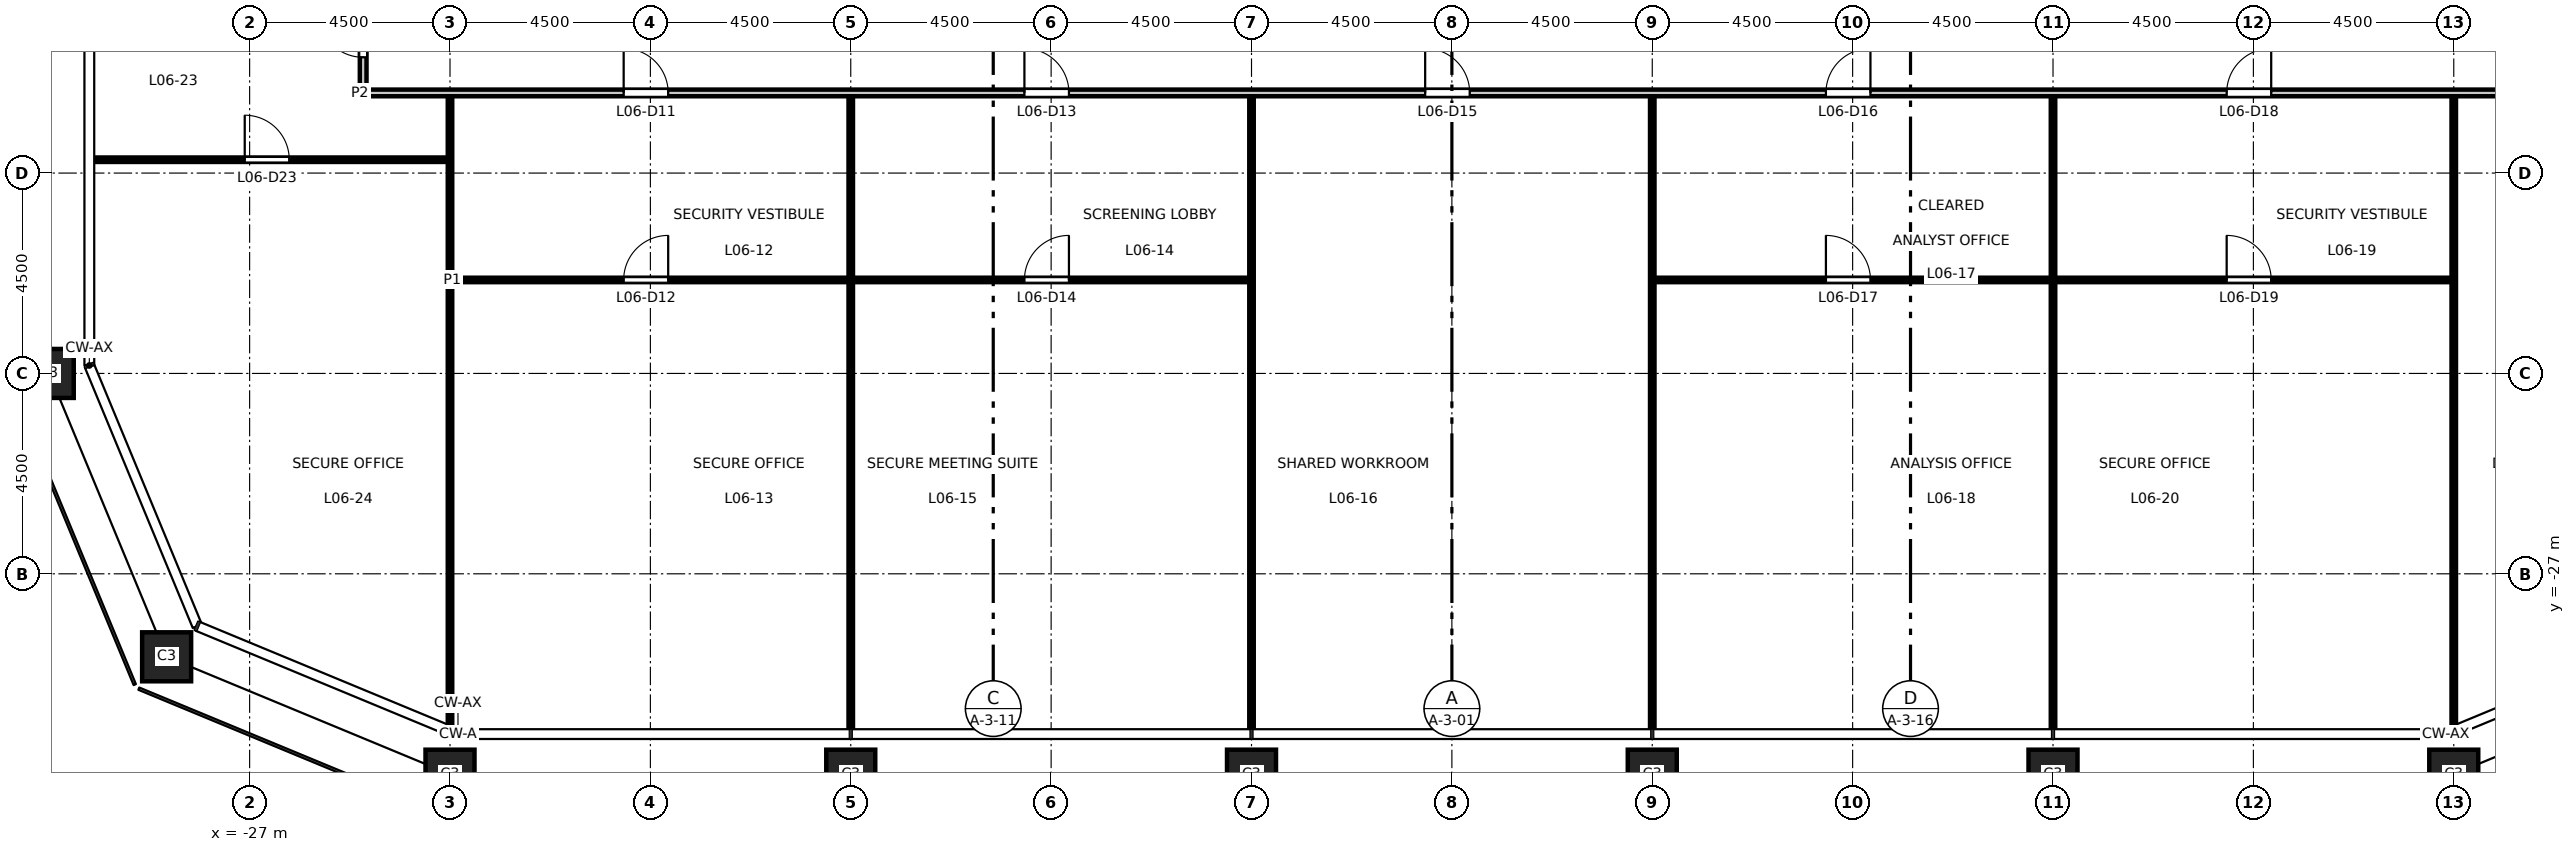
"""IFC4 building model, lengths in metres.
Left out: names, types, materials, properties, quantities, classifications, styles, units other than length and angle.
Written with IfcOpenShell. Run it as: python <this file> out.ifc"""

import sys

from ifc_helpers import new_model, si_unit, direction, frame, frame_2d, origin, origin_2d, place, context, subcontext, project, spatial, rectangle, hollow_rectangle, extrude, element, fill, save


model = new_model("IFC4")
c1 = context("Model", 3, precision=1e-05, world=origin(), true_north=direction((0.0, 1.0)))
c2 = subcontext(c1, "Body", "Model", "MODEL_VIEW")
j1 = project(units=[si_unit("LENGTHUNIT", "METRE"), si_unit("PLANEANGLEUNIT", "RADIAN")], contexts=[c1])
p1 = place(None, origin())
s1 = spatial("IfcSite", under=j1, at=p1, CompositionType="ELEMENT")
p2 = place(p1, origin())
s2 = spatial("IfcBuilding", under=s1, at=p2, CompositionType="ELEMENT")
p3 = place(p2, frame((0.0, 0.0, 31.2)))
s3 = spatial("IfcBuildingStorey", under=s2, at=p3, CompositionType="ELEMENT", Elevation=31.2)
for number, where, z_axis, x_axis in (
    (1, (-22.5, -31.5, 0.0), (0.0, 0.0, 1.0), (1.0, 0.0, 0.0)),
    (2, (-13.5, -31.5, 0.0), (0.0, 0.0, 1.0), (1.0, 0.0, 0.0)),
    (3, (-4.5, -31.5, 0.0), (0.0, 0.0, 1.0), (1.0, 0.0, 0.0)),
    (4, (4.5, -31.5, 0.0), (0.0, 0.0, 1.0), (1.0, 0.0, 0.0)),
    (5, (13.5, -31.5, 0.0), (0.0, 0.0, 1.0), (1.0, 0.0, 0.0)),
    (6, (22.5, -31.5, 0.0), (0.0, 0.0, 1.0), (1.0, 0.0, 0.0)),
    (7, (-31.5, -22.5, 0.0), (0.0, 0.0, 1.0), (1.0, 0.0, 0.0)),
    (8, (-28.864, -28.864, 0.0), (0.0, 0.0, 1.0), (1.0, 0.0, 0.0)),
):
    element("IfcColumn", number, at=place(p3, frame(where, z_axis=z_axis, x_axis=x_axis)), inside=s3, PredefinedType="COLUMN", context=c2, shape_type="SweptSolid", body=[
        extrude(hollow_rectangle(XDim=1.1, YDim=1.1, WallThickness=0.07, at=origin_2d()), origin(), (0.0, 0.0, 1.0), 4.5),
    ])
p4 = place(p3, frame((-22.45, -20.4, 0.0), z_axis=(0.0, 0.0, 1.0), x_axis=(1.0, 0.0, 0.0)))
e9 = element("IfcWall", 9, at=p4, inside=s3, PredefinedType="PARTITIONING", context=c2, shape_type="SweptSolid", body=[
    extrude(rectangle(XDim=17.9, YDim=0.1, at=frame_2d((8.95, 0.0))), origin(), (0.0, 0.0, 1.0), 4.35),
])
p5 = place(p4, frame((3.85, 0.0, 0.0)))
e10 = element("IfcOpeningElement", 10, at=p5, cuts=e9, PredefinedType="OPENING", context=c2, shape_type="SweptSolid", body=[
    extrude(rectangle(XDim=1.0, YDim=2.1, at=frame_2d((0.5, 1.05))), frame((0.0, 0.06, 0.0), z_axis=(0.0, -1.0, 0.0), x_axis=(1.0, 0.0, 0.0)), (0.0, 0.0, 1.0), 0.12),
])
p6 = place(p4, frame((12.85, 0.0, 0.0)))
e11 = element("IfcOpeningElement", 11, at=p6, cuts=e9, PredefinedType="OPENING", context=c2, shape_type="SweptSolid", body=[
    extrude(rectangle(XDim=1.0, YDim=2.1, at=frame_2d((0.5, 1.05))), frame((0.0, 0.06, 0.0), z_axis=(0.0, -1.0, 0.0), x_axis=(1.0, 0.0, 0.0)), (0.0, 0.0, 1.0), 0.12),
])
p7 = place(p3, frame((4.55, -20.4, 0.0), z_axis=(0.0, 0.0, 1.0), x_axis=(1.0, 0.0, 0.0)))
e12 = element("IfcWall", 12, at=p7, inside=s3, PredefinedType="PARTITIONING", context=c2, shape_type="SweptSolid", body=[
    extrude(rectangle(XDim=17.9, YDim=0.1, at=frame_2d((8.95, 0.0))), origin(), (0.0, 0.0, 1.0), 4.35),
])
p8 = place(p7, frame((3.85, 0.0, 0.0)))
e13 = element("IfcOpeningElement", 13, at=p8, cuts=e12, PredefinedType="OPENING", context=c2, shape_type="SweptSolid", body=[
    extrude(rectangle(XDim=1.0, YDim=2.1, at=frame_2d((0.5, 1.05))), frame((0.0, 0.06, 0.0), z_axis=(0.0, -1.0, 0.0), x_axis=(1.0, 0.0, 0.0)), (0.0, 0.0, 1.0), 0.12),
])
p9 = place(p7, frame((12.85, 0.0, 0.0)))
e14 = element("IfcOpeningElement", 14, at=p9, cuts=e12, PredefinedType="OPENING", context=c2, shape_type="SweptSolid", body=[
    extrude(rectangle(XDim=1.0, YDim=2.1, at=frame_2d((0.5, 1.05))), frame((0.0, 0.06, 0.0), z_axis=(0.0, -1.0, 0.0), x_axis=(1.0, 0.0, 0.0)), (0.0, 0.0, 1.0), 0.12),
])
p10 = place(p3, frame((-30.51, -17.7, 0.0), z_axis=(0.0, 0.0, 1.0), x_axis=(1.0, 0.0, 0.0)))
e15 = element("IfcWall", 15, at=p10, inside=s3, PredefinedType="PARTITIONING", context=c2, shape_type="SweptSolid", body=[
    extrude(rectangle(XDim=7.96, YDim=0.1, at=frame_2d((3.98, 0.0))), origin(), (0.0, 0.0, 1.0), 4.35),
])
p11 = place(p10, frame((3.4, 0.0, 0.0)))
e16 = element("IfcOpeningElement", 16, at=p11, cuts=e15, PredefinedType="OPENING", context=c2, shape_type="SweptSolid", body=[
    extrude(rectangle(XDim=1.0, YDim=2.1, at=frame_2d((0.5, 1.05))), frame((0.0, 0.06, 0.0), z_axis=(0.0, -1.0, 0.0), x_axis=(1.0, 0.0, 0.0)), (0.0, 0.0, 1.0), 0.12),
])
p12 = place(p3, frame((-24.525, -16.2, 0.0), z_axis=(0.0, 0.0, 1.0), x_axis=(1.0, 0.0, 0.0)))
e17 = element("IfcWall", 17, at=p12, inside=s3, PredefinedType="PARTITIONING", context=c2, shape_type="SweptSolid", body=[
    extrude(rectangle(XDim=49.05, YDim=0.15, at=frame_2d((24.525, 0.0))), origin(), (0.0, 0.0, 1.0), 4.35),
])
p13 = place(p12, frame((5.925, 0.0, 0.0)))
e18 = element("IfcOpeningElement", 18, at=p13, cuts=e17, PredefinedType="OPENING", context=c2, shape_type="SweptSolid", body=[
    extrude(rectangle(XDim=1.0, YDim=2.1, at=frame_2d((0.5, 1.05))), frame((0.0, 0.085, 0.0), z_axis=(0.0, -1.0, 0.0), x_axis=(1.0, 0.0, 0.0)), (0.0, 0.0, 1.0), 0.17),
])
p14 = place(p12, frame((14.925, 0.0, 0.0)))
e19 = element("IfcOpeningElement", 19, at=p14, cuts=e17, PredefinedType="OPENING", context=c2, shape_type="SweptSolid", body=[
    extrude(rectangle(XDim=1.0, YDim=2.1, at=frame_2d((0.5, 1.05))), frame((0.0, 0.085, 0.0), z_axis=(0.0, -1.0, 0.0), x_axis=(1.0, 0.0, 0.0)), (0.0, 0.0, 1.0), 0.17),
])
p15 = place(p12, frame((23.925, 0.0, 0.0)))
e20 = element("IfcOpeningElement", 20, at=p15, cuts=e17, PredefinedType="OPENING", context=c2, shape_type="SweptSolid", body=[
    extrude(rectangle(XDim=1.0, YDim=2.1, at=frame_2d((0.5, 1.05))), frame((0.0, 0.085, 0.0), z_axis=(0.0, -1.0, 0.0), x_axis=(1.0, 0.0, 0.0)), (0.0, 0.0, 1.0), 0.17),
])
p16 = place(p12, frame((32.925, 0.0, 0.0)))
e21 = element("IfcOpeningElement", 21, at=p16, cuts=e17, PredefinedType="OPENING", context=c2, shape_type="SweptSolid", body=[
    extrude(rectangle(XDim=1.0, YDim=2.1, at=frame_2d((0.5, 1.05))), frame((0.0, 0.085, 0.0), z_axis=(0.0, -1.0, 0.0), x_axis=(1.0, 0.0, 0.0)), (0.0, 0.0, 1.0), 0.17),
])
p17 = place(p12, frame((41.925, 0.0, 0.0)))
e22 = element("IfcOpeningElement", 22, at=p17, cuts=e17, PredefinedType="OPENING", context=c2, shape_type="SweptSolid", body=[
    extrude(rectangle(XDim=1.0, YDim=2.1, at=frame_2d((0.5, 1.05))), frame((0.0, 0.085, 0.0), z_axis=(0.0, -1.0, 0.0), x_axis=(1.0, 0.0, 0.0)), (0.0, 0.0, 1.0), 0.17),
])
p18 = place(p3, frame((-24.45, -16.125, 0.0), z_axis=(0.0, 0.0, 1.0), x_axis=(0.0, 1.0, 0.0)))
e23 = element("IfcWall", 23, at=p18, inside=s3, PredefinedType="PARTITIONING", context=c2, shape_type="SweptSolid", body=[
    extrude(rectangle(XDim=32.25, YDim=0.15, at=frame_2d((16.125, 0.0))), origin(), (0.0, 0.0, 1.0), 4.35),
])
p19 = place(p18, frame((30.425, 0.0, 0.0)))
e24 = element("IfcOpeningElement", 24, at=p19, cuts=e23, PredefinedType="OPENING", context=c2, shape_type="SweptSolid", body=[
    extrude(rectangle(XDim=1.0, YDim=2.1, at=frame_2d((0.5, 1.05))), frame((0.0, 0.085, 0.0), z_axis=(0.0, -1.0, 0.0), x_axis=(1.0, 0.0, 0.0)), (0.0, 0.0, 1.0), 0.17),
])
p20 = place(p18, frame((0.725, 0.0, 0.0)))
e25 = element("IfcOpeningElement", 25, at=p20, cuts=e23, PredefinedType="OPENING", context=c2, shape_type="SweptSolid", body=[
    extrude(rectangle(XDim=1.0, YDim=2.1, at=frame_2d((0.5, 1.05))), frame((0.0, 0.085, 0.0), z_axis=(0.0, -1.0, 0.0), x_axis=(1.0, 0.0, 0.0)), (0.0, 0.0, 1.0), 0.17),
])
p21 = place(p18, frame((6.725, 0.0, 0.0)))
e26 = element("IfcOpeningElement", 26, at=p21, cuts=e23, PredefinedType="OPENING", context=c2, shape_type="SweptSolid", body=[
    extrude(rectangle(XDim=1.0, YDim=2.1, at=frame_2d((0.5, 1.05))), frame((0.0, 0.085, 0.0), z_axis=(0.0, -1.0, 0.0), x_axis=(1.0, 0.0, 0.0)), (0.0, 0.0, 1.0), 0.17),
])
p22 = place(p18, frame((15.725, 0.0, 0.0)))
e27 = element("IfcOpeningElement", 27, at=p22, cuts=e23, PredefinedType="OPENING", context=c2, shape_type="SweptSolid", body=[
    extrude(rectangle(XDim=1.0, YDim=2.1, at=frame_2d((0.5, 1.05))), frame((0.0, 0.085, 0.0), z_axis=(0.0, -1.0, 0.0), x_axis=(1.0, 0.0, 0.0)), (0.0, 0.0, 1.0), 0.17),
])
p23 = place(p18, frame((24.725, 0.0, 0.0)))
e28 = element("IfcOpeningElement", 28, at=p23, cuts=e23, PredefinedType="OPENING", context=c2, shape_type="SweptSolid", body=[
    extrude(rectangle(XDim=1.0, YDim=2.1, at=frame_2d((0.5, 1.05))), frame((0.0, 0.085, 0.0), z_axis=(0.0, -1.0, 0.0), x_axis=(1.0, 0.0, 0.0)), (0.0, 0.0, 1.0), 0.17),
])
p24 = place(p3, frame((-22.5, -30.428, 0.0), z_axis=(0.0, 0.0, 1.0), x_axis=(0.0, 1.0, 0.0)))
e29 = element("IfcWall", 29, at=p24, inside=s3, PredefinedType="PARTITIONING", context=c2, shape_type="SweptSolid", body=[
    extrude(rectangle(XDim=14.153, YDim=0.1, at=frame_2d((7.077, 0.0))), origin(), (0.0, 0.0, 1.0), 3.35),
])
p25 = place(p3, frame((-13.5, -30.51, 0.0), z_axis=(0.0, 0.0, 1.0), x_axis=(0.0, 1.0, 0.0)))
e30 = element("IfcWall", 30, at=p25, inside=s3, PredefinedType="PARTITIONING", context=c2, shape_type="SweptSolid", body=[
    extrude(rectangle(XDim=10.06, YDim=0.1, at=frame_2d((5.03, 0.0))), origin(), (0.0, 0.0, 1.0), 3.35),
])
p26 = place(p3, frame((-13.5, -20.35, 0.0), z_axis=(0.0, 0.0, 1.0), x_axis=(0.0, 1.0, 0.0)))
e31 = element("IfcWall", 31, at=p26, inside=s3, PredefinedType="PARTITIONING", context=c2, shape_type="SweptSolid", body=[
    extrude(rectangle(XDim=4.075, YDim=0.1, at=frame_2d((2.038, 0.0))), origin(), (0.0, 0.0, 1.0), 3.35),
])
for number, where, z_axis, x_axis in (
    (32, (-4.5, -30.51, 0.0), (0.0, 0.0, 1.0), (0.0, 1.0, 0.0)),
    (33, (4.5, -30.51, 0.0), (0.0, 0.0, 1.0), (0.0, 1.0, 0.0)),
):
    element("IfcWall", number, at=place(p3, frame(where, z_axis=z_axis, x_axis=x_axis)), inside=s3, PredefinedType="PARTITIONING", context=c2, shape_type="SweptSolid", body=[
        extrude(rectangle(XDim=14.235, YDim=0.1, at=frame_2d((7.118, 0.0))), origin(), (0.0, 0.0, 1.0), 3.35),
    ])
p27 = place(p3, frame((13.5, -30.51, 0.0), z_axis=(0.0, 0.0, 1.0), x_axis=(0.0, 1.0, 0.0)))
e34 = element("IfcWall", 34, at=p27, inside=s3, PredefinedType="PARTITIONING", context=c2, shape_type="SweptSolid", body=[
    extrude(rectangle(XDim=10.06, YDim=0.1, at=frame_2d((5.03, 0.0))), origin(), (0.0, 0.0, 1.0), 3.35),
])
p28 = place(p3, frame((13.5, -20.35, 0.0), z_axis=(0.0, 0.0, 1.0), x_axis=(0.0, 1.0, 0.0)))
e35 = element("IfcWall", 35, at=p28, inside=s3, PredefinedType="PARTITIONING", context=c2, shape_type="SweptSolid", body=[
    extrude(rectangle(XDim=4.075, YDim=0.1, at=frame_2d((2.038, 0.0))), origin(), (0.0, 0.0, 1.0), 3.35),
])
p29 = place(p3, frame((22.5, -30.428, 0.0), z_axis=(0.0, 0.0, 1.0), x_axis=(0.0, 1.0, 0.0)))
e36 = element("IfcWall", 36, at=p29, inside=s3, PredefinedType="PARTITIONING", context=c2, shape_type="SweptSolid", body=[
    extrude(rectangle(XDim=14.153, YDim=0.1, at=frame_2d((7.077, 0.0))), origin(), (0.0, 0.0, 1.0), 3.35),
])
p30 = place(p13, origin())
e37 = element("IfcDoor", 37, at=p30, inside=s3, OperationType="SINGLE_SWING_LEFT", PredefinedType="DOOR", context=c2, shape_type="SweptSolid", body=[
    extrude(rectangle(XDim=1.0, YDim=2.1, at=frame_2d((0.5, 1.05))), frame((0.0, 0.025, 0.0), z_axis=(0.0, -1.0, 0.0), x_axis=(1.0, 0.0, 0.0)), (0.0, 0.0, 1.0), 0.05),
])
fill(e18, e37)
p31 = place(p5, origin())
e38 = element("IfcDoor", 38, at=p31, inside=s3, OperationType="SINGLE_SWING_RIGHT", PredefinedType="DOOR", context=c2, shape_type="SweptSolid", body=[
    extrude(rectangle(XDim=1.0, YDim=2.1, at=frame_2d((0.5, 1.05))), frame((0.0, 0.025, 0.0), z_axis=(0.0, -1.0, 0.0), x_axis=(1.0, 0.0, 0.0)), (0.0, 0.0, 1.0), 0.05),
])
fill(e10, e38)
p32 = place(p14, origin())
e39 = element("IfcDoor", 39, at=p32, inside=s3, OperationType="SINGLE_SWING_LEFT", PredefinedType="DOOR", context=c2, shape_type="SweptSolid", body=[
    extrude(rectangle(XDim=1.0, YDim=2.1, at=frame_2d((0.5, 1.05))), frame((0.0, 0.025, 0.0), z_axis=(0.0, -1.0, 0.0), x_axis=(1.0, 0.0, 0.0)), (0.0, 0.0, 1.0), 0.05),
])
fill(e19, e39)
p33 = place(p6, origin())
e40 = element("IfcDoor", 40, at=p33, inside=s3, OperationType="SINGLE_SWING_RIGHT", PredefinedType="DOOR", context=c2, shape_type="SweptSolid", body=[
    extrude(rectangle(XDim=1.0, YDim=2.1, at=frame_2d((0.5, 1.05))), frame((0.0, 0.025, 0.0), z_axis=(0.0, -1.0, 0.0), x_axis=(1.0, 0.0, 0.0)), (0.0, 0.0, 1.0), 0.05),
])
fill(e11, e40)
p34 = place(p15, origin())
e41 = element("IfcDoor", 41, at=p34, inside=s3, OperationType="SINGLE_SWING_LEFT", PredefinedType="DOOR", context=c2, shape_type="SweptSolid", body=[
    extrude(rectangle(XDim=1.0, YDim=2.1, at=frame_2d((0.5, 1.05))), frame((0.0, 0.025, 0.0), z_axis=(0.0, -1.0, 0.0), x_axis=(1.0, 0.0, 0.0)), (0.0, 0.0, 1.0), 0.05),
])
fill(e20, e41)
p35 = place(p16, origin())
e42 = element("IfcDoor", 42, at=p35, inside=s3, OperationType="SINGLE_SWING_RIGHT", PredefinedType="DOOR", context=c2, shape_type="SweptSolid", body=[
    extrude(rectangle(XDim=1.0, YDim=2.1, at=frame_2d((0.5, 1.05))), frame((0.0, 0.025, 0.0), z_axis=(0.0, -1.0, 0.0), x_axis=(1.0, 0.0, 0.0)), (0.0, 0.0, 1.0), 0.05),
])
fill(e21, e42)
p36 = place(p8, origin())
e43 = element("IfcDoor", 43, at=p36, inside=s3, OperationType="SINGLE_SWING_LEFT", PredefinedType="DOOR", context=c2, shape_type="SweptSolid", body=[
    extrude(rectangle(XDim=1.0, YDim=2.1, at=frame_2d((0.5, 1.05))), frame((0.0, 0.025, 0.0), z_axis=(0.0, -1.0, 0.0), x_axis=(1.0, 0.0, 0.0)), (0.0, 0.0, 1.0), 0.05),
])
fill(e13, e43)
p37 = place(p17, origin())
e44 = element("IfcDoor", 44, at=p37, inside=s3, OperationType="SINGLE_SWING_RIGHT", PredefinedType="DOOR", context=c2, shape_type="SweptSolid", body=[
    extrude(rectangle(XDim=1.0, YDim=2.1, at=frame_2d((0.5, 1.05))), frame((0.0, 0.025, 0.0), z_axis=(0.0, -1.0, 0.0), x_axis=(1.0, 0.0, 0.0)), (0.0, 0.0, 1.0), 0.05),
])
fill(e22, e44)
p38 = place(p9, origin())
e45 = element("IfcDoor", 45, at=p38, inside=s3, OperationType="SINGLE_SWING_LEFT", PredefinedType="DOOR", context=c2, shape_type="SweptSolid", body=[
    extrude(rectangle(XDim=1.0, YDim=2.1, at=frame_2d((0.5, 1.05))), frame((0.0, 0.025, 0.0), z_axis=(0.0, -1.0, 0.0), x_axis=(1.0, 0.0, 0.0)), (0.0, 0.0, 1.0), 0.05),
])
fill(e14, e45)
p39 = place(p20, origin())
e46 = element("IfcDoor", 46, at=p39, inside=s3, OperationType="SINGLE_SWING_RIGHT", PredefinedType="DOOR", context=c2, shape_type="SweptSolid", body=[
    extrude(rectangle(XDim=1.0, YDim=2.1, at=frame_2d((0.5, 1.05))), frame((0.0, 0.025, 0.0), z_axis=(0.0, -1.0, 0.0), x_axis=(1.0, 0.0, 0.0)), (0.0, 0.0, 1.0), 0.05),
])
fill(e25, e46)
p40 = place(p11, origin())
e47 = element("IfcDoor", 47, at=p40, inside=s3, OperationType="SINGLE_SWING_LEFT", PredefinedType="DOOR", context=c2, shape_type="SweptSolid", body=[
    extrude(rectangle(XDim=1.0, YDim=2.1, at=frame_2d((0.5, 1.05))), frame((0.0, 0.025, 0.0), z_axis=(0.0, -1.0, 0.0), x_axis=(1.0, 0.0, 0.0)), (0.0, 0.0, 1.0), 0.05),
])
fill(e16, e47)
save(model, sys.argv[1])
